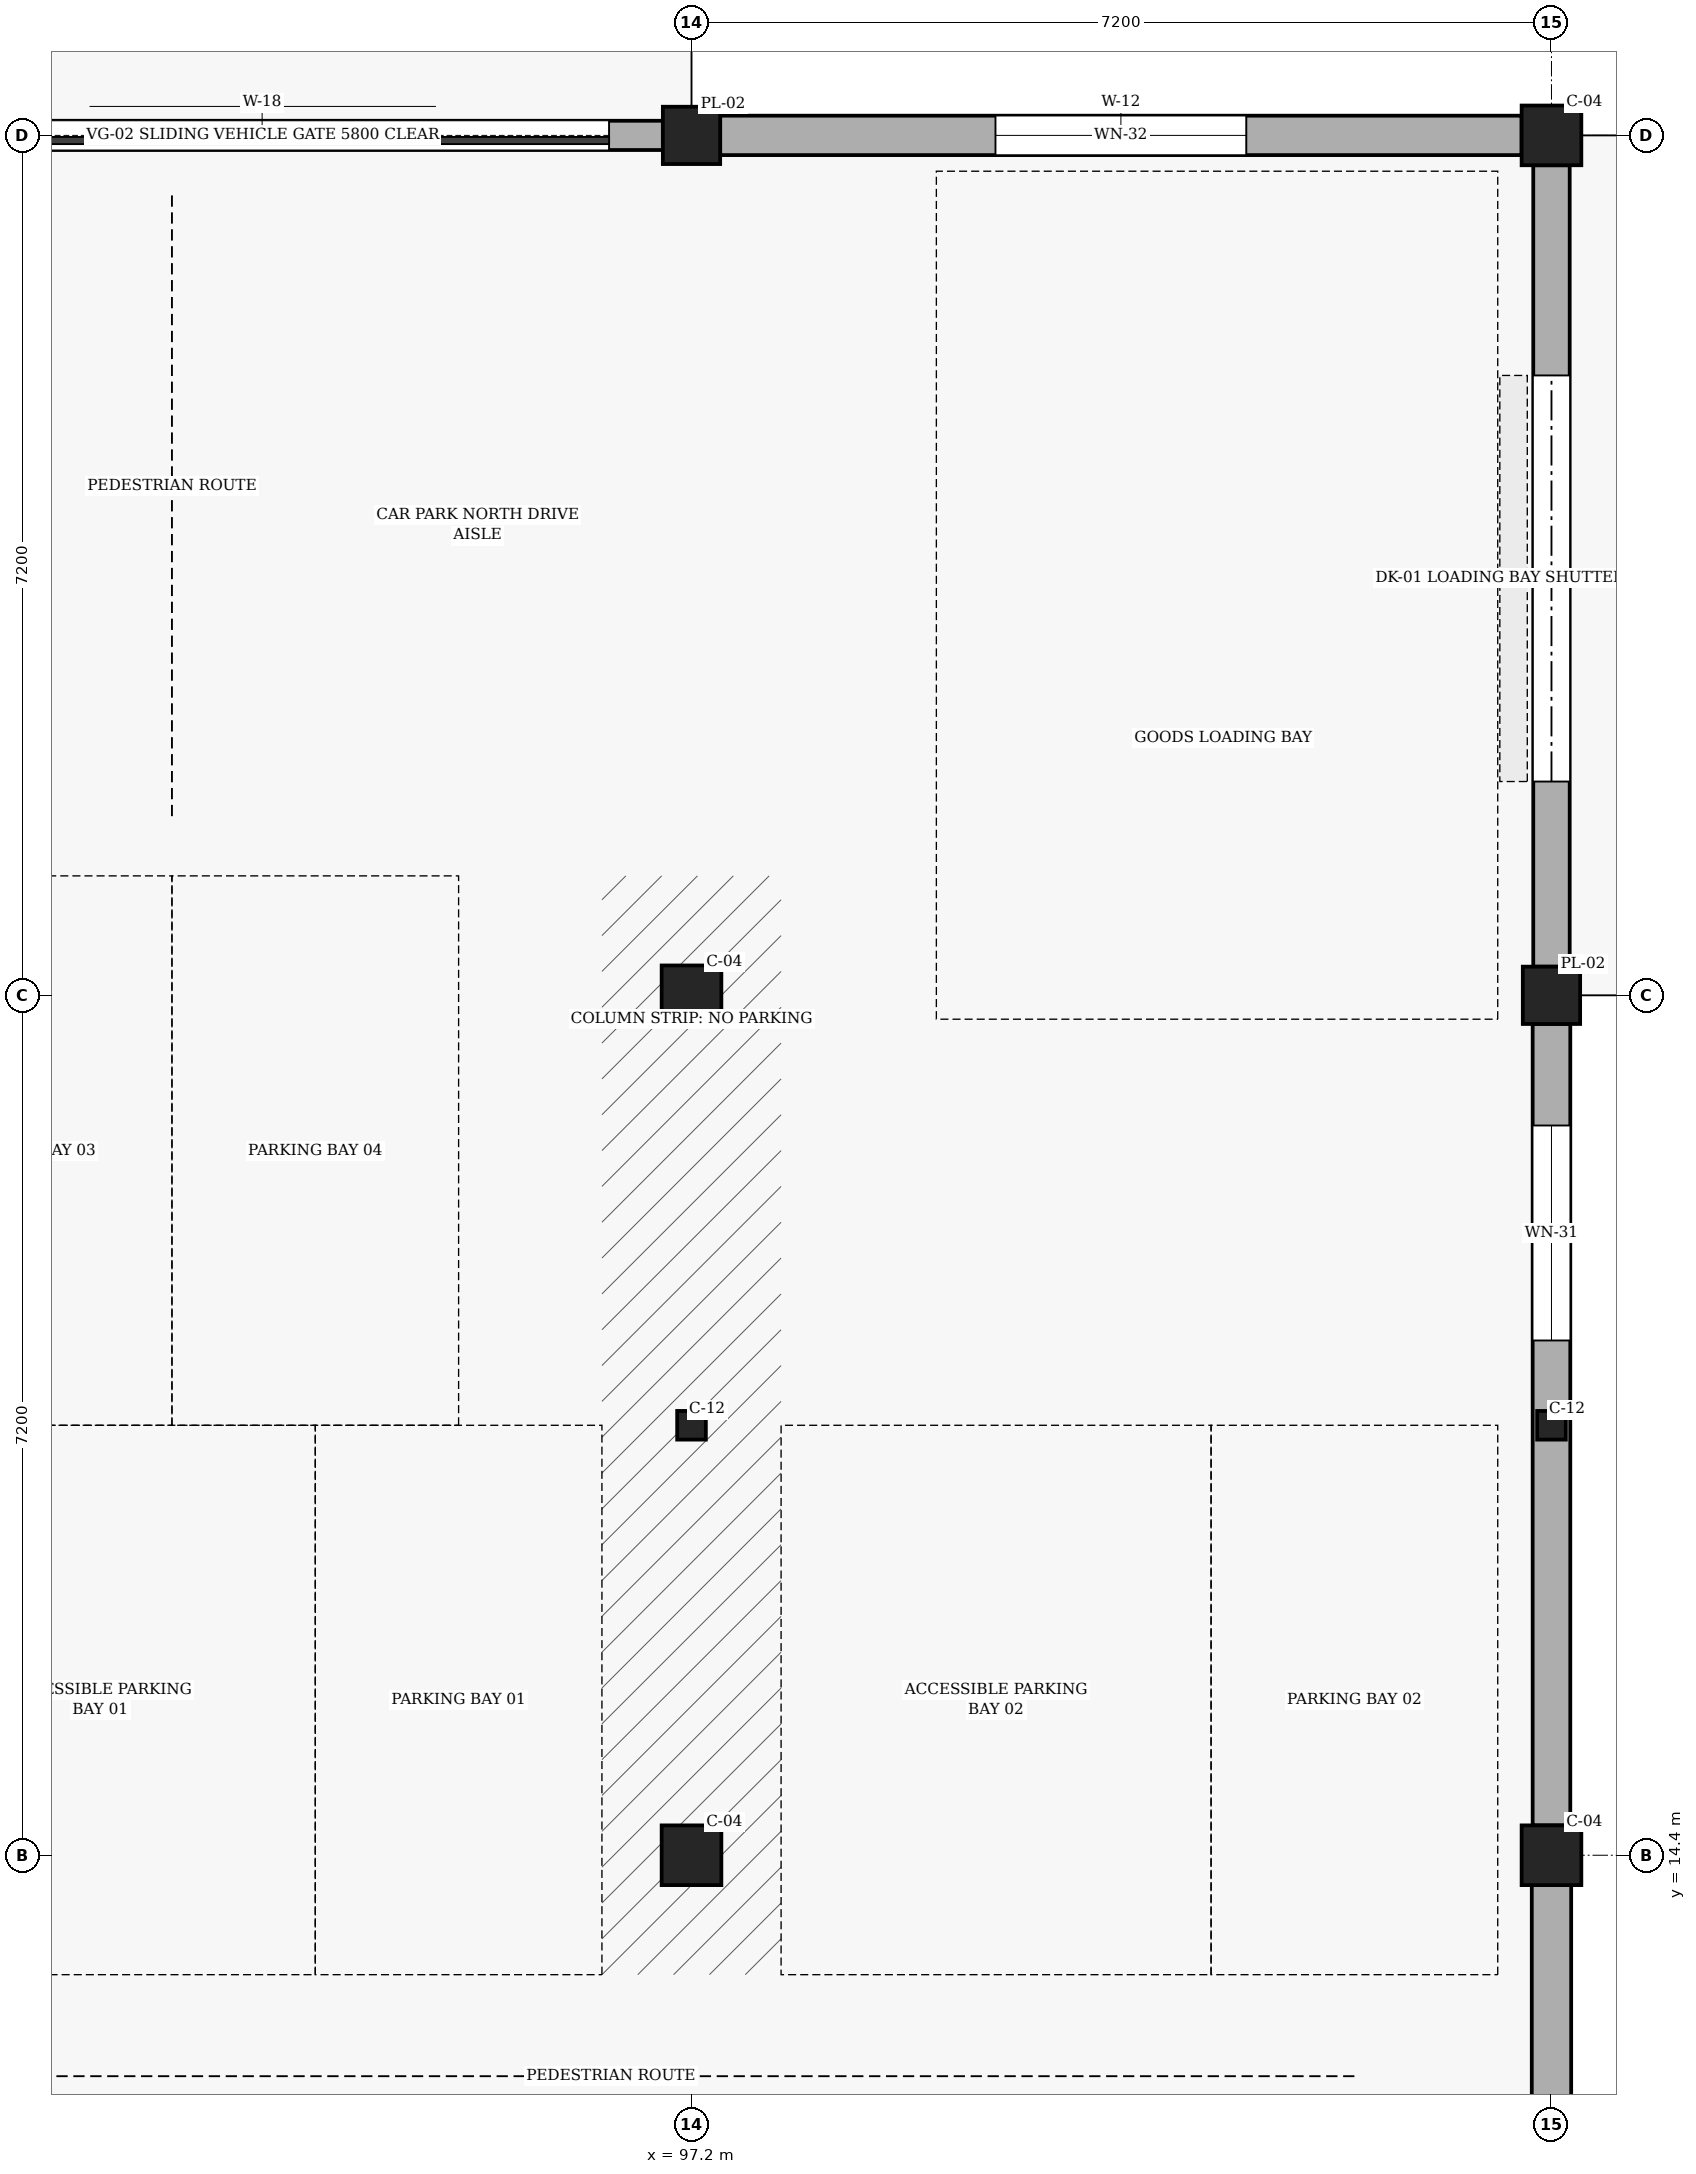
"""IFC4 building model, lengths in metres.
Left out: names, types, materials, properties, quantities, classifications, styles, units other than length and angle.
Written with IfcOpenShell. Run it as: python <this file> out.ifc"""

import sys

from ifc_helpers import new_model, si_unit, direction, frame, frame_2d, origin, origin_2d, place, context, subcontext, project, spatial, rectangle, i_section, extrude, element, fill, save


model = new_model("IFC4")
c1 = context("Model", 3, precision=1e-05, world=origin(), true_north=direction((0.0, 1.0)))
c2 = subcontext(c1, "Body", "Model", "MODEL_VIEW")
j1 = project(units=[si_unit("LENGTHUNIT", "METRE"), si_unit("PLANEANGLEUNIT", "RADIAN")], contexts=[c1])
p1 = place(None, origin())
s1 = spatial("IfcSite", under=j1, at=p1, CompositionType="ELEMENT")
p2 = place(p1, origin())
s2 = spatial("IfcBuilding", under=s1, at=p2, CompositionType="ELEMENT")
p3 = place(p2, origin())
s3 = spatial("IfcBuildingStorey", under=s2, at=p3, CompositionType="ELEMENT", Elevation=0.0)
for number, where, z_axis, x_axis in (
    (1, (97.2, 14.4, 0.0), (0.0, 0.0, 1.0), (1.0, 0.0, 0.0)),
    (2, (97.2, 21.6, 0.0), (0.0, 0.0, 1.0), (1.0, 0.0, 0.0)),
):
    element("IfcColumn", number, at=place(p3, frame(where, z_axis=z_axis, x_axis=x_axis)), inside=s3, PredefinedType="COLUMN", context=c2, shape_type="SweptSolid", body=[
        extrude(rectangle(XDim=0.5, YDim=0.5, at=origin_2d()), origin(), (0.0, 0.0, 1.0), 6.067),
    ])
p4 = place(p3, frame((97.2, 28.8, 0.0), z_axis=(0.0, 0.0, 1.0), x_axis=(1.0, 0.0, 0.0)))
e3 = element("IfcColumn", 3, at=p4, inside=s3, PredefinedType="PILASTER", context=c2, shape_type="SweptSolid", body=[
    extrude(rectangle(XDim=0.48, YDim=0.48, at=origin_2d()), origin(), (0.0, 0.0, 1.0), 4.5),
])
p5 = place(p3, frame((104.4, 14.4, 0.0), z_axis=(0.0, 0.0, 1.0), x_axis=(1.0, 0.0, 0.0)))
e4 = element("IfcColumn", 4, at=p5, inside=s3, PredefinedType="COLUMN", context=c2, shape_type="SweptSolid", body=[
    extrude(rectangle(XDim=0.5, YDim=0.5, at=origin_2d()), origin(), (0.0, 0.0, 1.0), 6.067),
])
p6 = place(p3, frame((104.4, 21.6, 0.0), z_axis=(0.0, 0.0, 1.0), x_axis=(1.0, 0.0, 0.0)))
e5 = element("IfcColumn", 5, at=p6, inside=s3, PredefinedType="PILASTER", context=c2, shape_type="SweptSolid", body=[
    extrude(rectangle(XDim=0.48, YDim=0.48, at=origin_2d()), origin(), (0.0, 0.0, 1.0), 6.067),
])
p7 = place(p3, frame((104.4, 28.8, 0.0), z_axis=(0.0, 0.0, 1.0), x_axis=(1.0, 0.0, 0.0)))
e6 = element("IfcColumn", 6, at=p7, inside=s3, PredefinedType="COLUMN", context=c2, shape_type="SweptSolid", body=[
    extrude(rectangle(XDim=0.5, YDim=0.5, at=origin_2d()), origin(), (0.0, 0.0, 1.0), 4.5),
])
for number, where, z_axis, x_axis in (
    (7, (97.2, 18.0, 0.0), (0.0, 0.0, 1.0), (1.0, 0.0, 0.0)),
    (8, (104.4, 18.0, 0.0), (0.0, 0.0, 1.0), (1.0, 0.0, 0.0)),
):
    element("IfcColumn", number, at=place(p3, frame(where, z_axis=z_axis, x_axis=x_axis)), inside=s3, PredefinedType="COLUMN", context=c2, shape_type="SweptSolid", body=[
        extrude(i_section(OverallWidth=0.24, OverallDepth=0.24, WebThickness=0.01, FlangeThickness=0.017, FilletRadius=0.021, at=origin_2d()), origin(), (0.0, 0.0, 1.0), 4.5),
    ])
p8 = place(p3, frame((104.4, 7.45, 0.0), z_axis=(0.0, 0.0, 1.0), x_axis=(0.0, 1.0, 0.0)))
e9 = element("IfcWall", 9, at=p8, inside=s3, PredefinedType="SOLIDWALL", context=c2, shape_type="SweptSolid", body=[
    extrude(rectangle(XDim=6.7, YDim=0.33, at=frame_2d((3.35, 0.0))), origin(), (0.0, 0.0, 1.0), 3.83),
])
p9 = place(p8, frame((2.3, 0.0, 0.85)))
e10 = element("IfcOpeningElement", 10, at=p9, cuts=e9, PredefinedType="OPENING", context=c2, shape_type="SweptSolid", body=[
    extrude(rectangle(XDim=2.1, YDim=2.1, at=frame_2d((1.05, 1.05))), frame((0.0, 0.175, 0.0), z_axis=(0.0, -1.0, 0.0), x_axis=(1.0, 0.0, 0.0)), (0.0, 0.0, 1.0), 0.35),
])
p10 = place(p3, frame((104.4, 14.65, 0.0), z_axis=(0.0, 0.0, 1.0), x_axis=(0.0, 1.0, 0.0)))
e11 = element("IfcWall", 11, at=p10, inside=s3, PredefinedType="SOLIDWALL", context=c2, shape_type="SweptSolid", body=[
    extrude(rectangle(XDim=6.71, YDim=0.315, at=frame_2d((3.355, 0.0))), origin(), (0.0, 0.0, 1.0), 3.83),
])
p11 = place(p10, frame((4.06, 0.0, 0.85)))
e12 = element("IfcOpeningElement", 12, at=p11, cuts=e11, PredefinedType="OPENING", context=c2, shape_type="SweptSolid", body=[
    extrude(rectangle(XDim=1.8, YDim=2.1, at=frame_2d((0.9, 1.05))), frame((0.0, 0.167, 0.0), z_axis=(0.0, -1.0, 0.0), x_axis=(1.0, 0.0, 0.0)), (0.0, 0.0, 1.0), 0.335),
])
p12 = place(p3, frame((104.4, 21.84, 0.0), z_axis=(0.0, 0.0, 1.0), x_axis=(0.0, 1.0, 0.0)))
e13 = element("IfcWall", 13, at=p12, inside=s3, PredefinedType="SOLIDWALL", context=c2, shape_type="SweptSolid", body=[
    extrude(rectangle(XDim=6.71, YDim=0.305, at=frame_2d((3.355, 0.0))), origin(), (0.0, 0.0, 1.0), 3.83),
])
p13 = place(p12, frame((1.55, 0.0, 0.0)))
e14 = element("IfcOpeningElement", 14, at=p13, cuts=e13, PredefinedType="OPENING", context=c2, shape_type="SweptSolid", body=[
    extrude(rectangle(XDim=3.4, YDim=3.1, at=frame_2d((1.7, 1.55))), frame((0.0, 0.163, 0.0), z_axis=(0.0, -1.0, 0.0), x_axis=(1.0, 0.0, 0.0)), (0.0, 0.0, 1.0), 0.325),
])
p14 = place(p3, frame((104.15, 28.8, 0.0), z_axis=(0.0, 0.0, 1.0), x_axis=(-1.0, 0.0, 0.0)))
e15 = element("IfcWall", 15, at=p14, inside=s3, PredefinedType="SOLIDWALL", context=c2, shape_type="SweptSolid", body=[
    extrude(rectangle(XDim=6.71, YDim=0.33, at=frame_2d((3.355, 0.0))), origin(), (0.0, 0.0, 1.0), 3.83),
])
p15 = place(p14, frame((2.305, 0.0, 0.85)))
e16 = element("IfcOpeningElement", 16, at=p15, cuts=e15, PredefinedType="OPENING", context=c2, shape_type="SweptSolid", body=[
    extrude(rectangle(XDim=2.1, YDim=2.1, at=frame_2d((1.05, 1.05))), frame((0.0, 0.175, 0.0), z_axis=(0.0, -1.0, 0.0), x_axis=(1.0, 0.0, 0.0)), (0.0, 0.0, 1.0), 0.35),
])
p16 = place(p3, frame((96.96, 28.8, 0.0), z_axis=(0.0, 0.0, 1.0), x_axis=(-1.0, 0.0, 0.0)))
e17 = element("IfcWall", 17, at=p16, inside=s3, PredefinedType="SOLIDWALL", context=c2, shape_type="SweptSolid", body=[
    extrude(rectangle(XDim=6.71, YDim=0.245, at=frame_2d((3.355, 0.0))), origin(), (0.0, 0.0, 1.0), 3.83),
])
p17 = place(p16, frame((0.45, 0.0, 0.0)))
e18 = element("IfcOpeningElement", 18, at=p17, cuts=e17, PredefinedType="OPENING", context=c2, shape_type="SweptSolid", body=[
    extrude(rectangle(XDim=5.8, YDim=3.1, at=frame_2d((2.9, 1.55))), frame((0.0, 0.133, 0.0), z_axis=(0.0, -1.0, 0.0), x_axis=(1.0, 0.0, 0.0)), (0.0, 0.0, 1.0), 0.265),
])
p18 = place(p11, origin())
e19 = element("IfcWindow", 19, at=p18, inside=s3, PartitioningType="SINGLE_PANEL", PredefinedType="WINDOW", context=c2, shape_type="SweptSolid", body=[
    extrude(rectangle(XDim=1.8, YDim=2.1, at=frame_2d((0.9, 1.05))), frame((0.0, 0.03, 0.0), z_axis=(0.0, -1.0, 0.0), x_axis=(1.0, 0.0, 0.0)), (0.0, 0.0, 1.0), 0.06),
])
fill(e12, e19)
p19 = place(p13, frame((3.4, 0.0, 0.0), z_axis=(0.0, 0.0, 1.0), x_axis=(-1.0, 0.0, 0.0)))
e20 = element("IfcDoor", 20, at=p19, inside=s3, OperationType="ROLLINGUP", PredefinedType="DOOR", context=c2, shape_type="SweptSolid", body=[
    extrude(rectangle(XDim=3.4, YDim=3.1, at=frame_2d((1.7, 1.55))), frame((0.0, 0.025, 0.0), z_axis=(0.0, -1.0, 0.0), x_axis=(1.0, 0.0, 0.0)), (0.0, 0.0, 1.0), 0.05),
])
fill(e14, e20)
p20 = place(p15, origin())
e21 = element("IfcWindow", 21, at=p20, inside=s3, PartitioningType="SINGLE_PANEL", PredefinedType="WINDOW", context=c2, shape_type="SweptSolid", body=[
    extrude(rectangle(XDim=2.1, YDim=2.1, at=frame_2d((1.05, 1.05))), frame((0.0, 0.03, 0.0), z_axis=(0.0, -1.0, 0.0), x_axis=(1.0, 0.0, 0.0)), (0.0, 0.0, 1.0), 0.06),
])
fill(e16, e21)
p21 = place(p17, frame((5.8, 0.0, 0.0), z_axis=(0.0, 0.0, 1.0), x_axis=(-1.0, 0.0, 0.0)))
e22 = element("IfcDoor", 22, at=p21, inside=s3, OperationType="SLIDING_TO_LEFT", PredefinedType="GATE", context=c2, shape_type="SweptSolid", body=[
    extrude(rectangle(XDim=5.8, YDim=3.1, at=frame_2d((2.9, 1.55))), frame((0.0, 0.025, 0.0), z_axis=(0.0, -1.0, 0.0), x_axis=(1.0, 0.0, 0.0)), (0.0, 0.0, 1.0), 0.05),
])
fill(e18, e22)
save(model, sys.argv[1])
